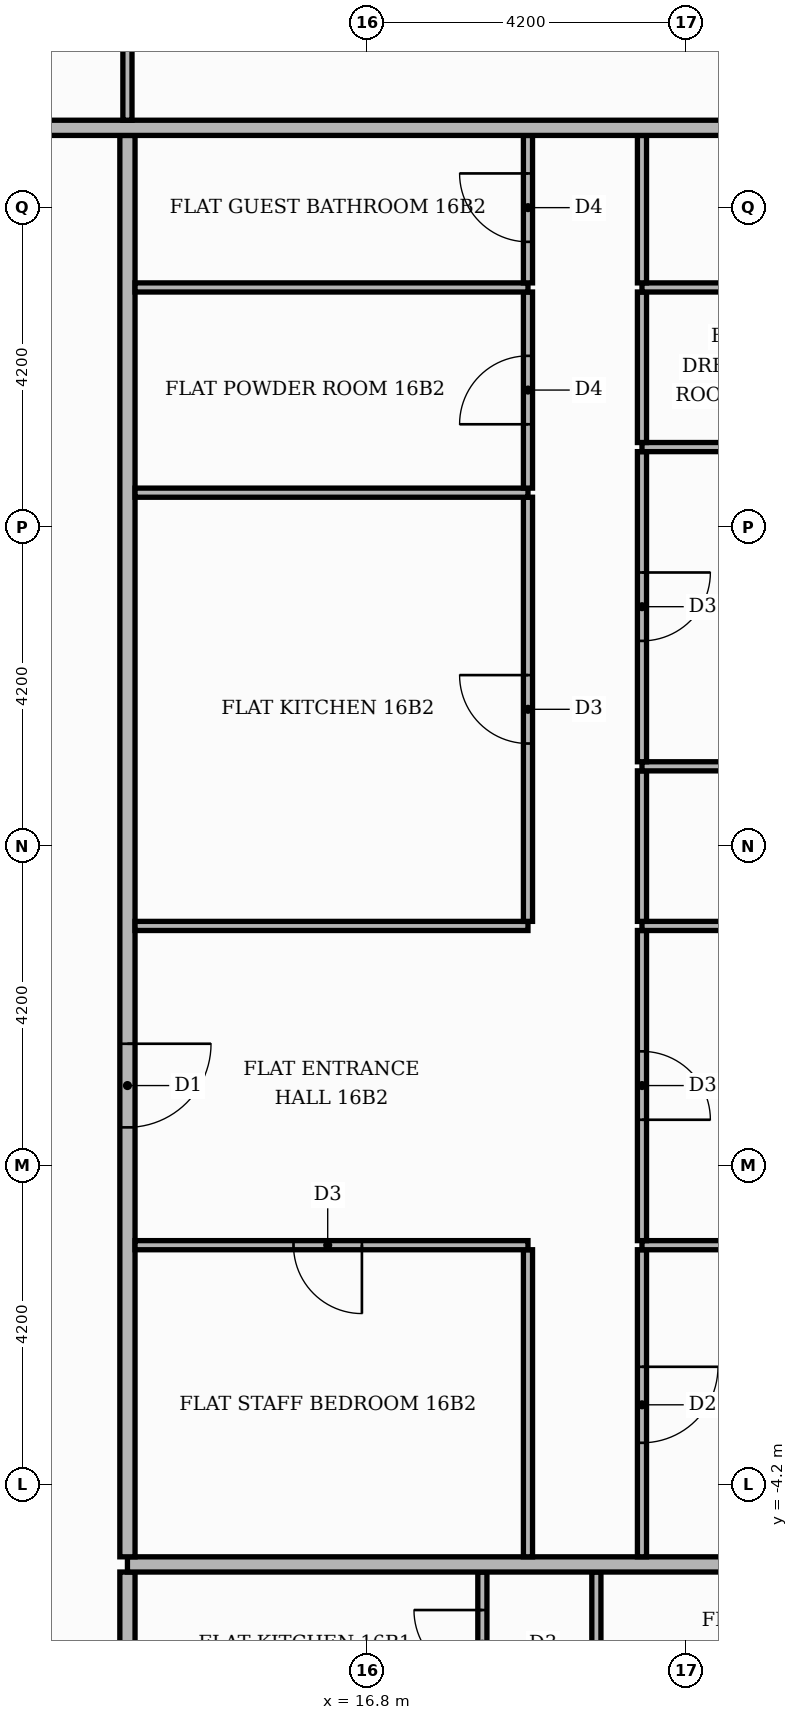
"""IFC4 building model, lengths in metres.
Left out: names, types, materials, properties, quantities, classifications, styles, units other than length and angle.
Written with IfcOpenShell. Run it as: python <this file> out.ifc"""

import sys

from ifc_helpers import new_model, si_unit, direction, frame, frame_2d, origin, place, context, subcontext, project, spatial, rectangle, extrude, element, fill, save


model = new_model("IFC4")
c1 = context("Model", 3, precision=1e-05, world=origin(), true_north=direction((0.0, 1.0)))
c2 = subcontext(c1, "Body", "Model", "MODEL_VIEW")
j1 = project(units=[si_unit("LENGTHUNIT", "METRE"), si_unit("PLANEANGLEUNIT", "RADIAN")], contexts=[c1])
p1 = place(None, origin())
s1 = spatial("IfcSite", under=j1, at=p1, CompositionType="ELEMENT")
p2 = place(p1, origin())
s2 = spatial("IfcBuilding", under=s1, at=p2, CompositionType="ELEMENT")
p3 = place(p2, frame((0.0, 0.0, 69.9)))
s3 = spatial("IfcBuildingStorey", under=s2, at=p3, CompositionType="ELEMENT", Elevation=69.9)
p4 = place(p3, frame((13.65, -13.55, 0.0), z_axis=(0.0, 0.0, 1.0), x_axis=(0.0, 1.0, 0.0)))
e1 = element("IfcWall", 1, at=p4, inside=s3, PredefinedType="PARTITIONING", context=c2, shape_type="SweptSolid", body=[
    extrude(rectangle(XDim=8.2, YDim=0.2, at=frame_2d((4.1, 0.0))), origin(), (0.0, 0.0, 1.0), 3.4),
])
p5 = place(p4, frame((1.45, 0.0, 0.0)))
e2 = element("IfcOpeningElement", 2, at=p5, cuts=e1, PredefinedType="OPENING", context=c2, shape_type="SweptSolid", body=[
    extrude(rectangle(XDim=1.1, YDim=2.4, at=frame_2d((0.55, 1.2))), frame((0.0, 0.11, 0.0), z_axis=(0.0, -1.0, 0.0), x_axis=(1.0, 0.0, 0.0)), (0.0, 0.0, 1.0), 0.22),
])
p6 = place(p3, frame((18.32, -7.29, 0.0), z_axis=(0.0, 0.0, 1.0), x_axis=(0.0, 1.0, 0.0)))
e3 = element("IfcWall", 3, at=p6, inside=s3, PredefinedType="PARTITIONING", context=c2, shape_type="SweptSolid", body=[
    extrude(rectangle(XDim=1.94, YDim=0.12, at=frame_2d((0.97, 0.0))), origin(), (0.0, 0.0, 1.0), 3.4),
])
p7 = place(p6, frame((0.54, 0.0, 0.0)))
e4 = element("IfcOpeningElement", 4, at=p7, cuts=e3, PredefinedType="OPENING", context=c2, shape_type="SweptSolid", body=[
    extrude(rectangle(XDim=0.9, YDim=2.1, at=frame_2d((0.45, 1.05))), frame((0.0, 0.07, 0.0), z_axis=(0.0, -1.0, 0.0), x_axis=(1.0, 0.0, 0.0)), (0.0, 0.0, 1.0), 0.14),
])
p8 = place(p3, frame((19.82, -7.29, 0.0), z_axis=(0.0, 0.0, 1.0), x_axis=(0.0, 1.0, 0.0)))
e5 = element("IfcWall", 5, at=p8, inside=s3, PredefinedType="PARTITIONING", context=c2, shape_type="SweptSolid", body=[
    extrude(rectangle(XDim=1.94, YDim=0.12, at=frame_2d((0.97, 0.0))), origin(), (0.0, 0.0, 1.0), 3.4),
])
p9 = place(p3, frame((13.65, -5.25, 0.0), z_axis=(0.0, 0.0, 1.0), x_axis=(1.0, 0.0, 0.0)))
e6 = element("IfcWall", 6, at=p9, inside=s3, PredefinedType="PARTITIONING", context=c2, shape_type="SweptSolid", body=[
    extrude(rectangle(XDim=11.77, YDim=0.2, at=frame_2d((5.885, 0.0))), origin(), (0.0, 0.0, 1.0), 3.4),
])
p10 = place(p3, frame((13.65, -5.15, 0.0), z_axis=(0.0, 0.0, 1.0), x_axis=(0.0, 1.0, 0.0)))
e7 = element("IfcWall", 7, at=p10, inside=s3, PredefinedType="PARTITIONING", context=c2, shape_type="SweptSolid", body=[
    extrude(rectangle(XDim=18.7, YDim=0.2, at=frame_2d((9.35, 0.0))), origin(), (0.0, 0.0, 1.0), 3.4),
])
p11 = place(p10, frame((5.65, 0.0, 0.0)))
e8 = element("IfcOpeningElement", 8, at=p11, cuts=e7, PredefinedType="OPENING", context=c2, shape_type="SweptSolid", body=[
    extrude(rectangle(XDim=1.1, YDim=2.4, at=frame_2d((0.55, 1.2))), frame((0.0, 0.11, 0.0), z_axis=(0.0, -1.0, 0.0), x_axis=(1.0, 0.0, 0.0)), (0.0, 0.0, 1.0), 0.22),
])
p12 = place(p3, frame((18.92, -5.15, 0.0), z_axis=(0.0, 0.0, 1.0), x_axis=(0.0, 1.0, 0.0)))
e9 = element("IfcWall", 9, at=p12, inside=s3, PredefinedType="PARTITIONING", context=c2, shape_type="SweptSolid", body=[
    extrude(rectangle(XDim=4.04, YDim=0.12, at=frame_2d((2.02, 0.0))), origin(), (0.0, 0.0, 1.0), 3.4),
])
p13 = place(p3, frame((20.42, -5.15, 0.0), z_axis=(0.0, 0.0, 1.0), x_axis=(0.0, 1.0, 0.0)))
e10 = element("IfcWall", 10, at=p13, inside=s3, PredefinedType="PARTITIONING", context=c2, shape_type="SweptSolid", body=[
    extrude(rectangle(XDim=4.04, YDim=0.12, at=frame_2d((2.02, 0.0))), origin(), (0.0, 0.0, 1.0), 3.4),
])
p14 = place(p13, frame((1.5, 0.0, 0.0)))
e11 = element("IfcOpeningElement", 11, at=p14, cuts=e10, PredefinedType="OPENING", context=c2, shape_type="SweptSolid", body=[
    extrude(rectangle(XDim=1.0, YDim=2.1, at=frame_2d((0.5, 1.05))), frame((0.0, 0.07, 0.0), z_axis=(0.0, -1.0, 0.0), x_axis=(1.0, 0.0, 0.0)), (0.0, 0.0, 1.0), 0.14),
])
p15 = place(p3, frame((13.75, -1.05, 0.0), z_axis=(0.0, 0.0, 1.0), x_axis=(1.0, 0.0, 0.0)))
e12 = element("IfcWall", 12, at=p15, inside=s3, PredefinedType="PARTITIONING", context=c2, shape_type="SweptSolid", body=[
    extrude(rectangle(XDim=5.17, YDim=0.12, at=frame_2d((2.585, 0.0))), origin(), (0.0, 0.0, 1.0), 3.4),
])
p16 = place(p15, frame((2.085, 0.0, 0.0)))
e13 = element("IfcOpeningElement", 13, at=p16, cuts=e12, PredefinedType="OPENING", context=c2, shape_type="SweptSolid", body=[
    extrude(rectangle(XDim=0.9, YDim=2.1, at=frame_2d((0.45, 1.05))), frame((0.0, 0.07, 0.0), z_axis=(0.0, -1.0, 0.0), x_axis=(1.0, 0.0, 0.0)), (0.0, 0.0, 1.0), 0.14),
])
p17 = place(p3, frame((20.42, -1.05, 0.0), z_axis=(0.0, 0.0, 1.0), x_axis=(1.0, 0.0, 0.0)))
e14 = element("IfcWall", 14, at=p17, inside=s3, PredefinedType="PARTITIONING", context=c2, shape_type="SweptSolid", body=[
    extrude(rectangle(XDim=5.0, YDim=0.12, at=frame_2d((2.5, 0.0))), origin(), (0.0, 0.0, 1.0), 3.4),
])
p18 = place(p3, frame((20.42, -0.99, 0.0), z_axis=(0.0, 0.0, 1.0), x_axis=(0.0, 1.0, 0.0)))
e15 = element("IfcWall", 15, at=p18, inside=s3, PredefinedType="PARTITIONING", context=c2, shape_type="SweptSolid", body=[
    extrude(rectangle(XDim=4.08, YDim=0.12, at=frame_2d((2.04, 0.0))), origin(), (0.0, 0.0, 1.0), 3.4),
])
p19 = place(p18, frame((1.59, 0.0, 0.0)))
e16 = element("IfcOpeningElement", 16, at=p19, cuts=e15, PredefinedType="OPENING", context=c2, shape_type="SweptSolid", body=[
    extrude(rectangle(XDim=0.9, YDim=2.1, at=frame_2d((0.45, 1.05))), frame((0.0, 0.07, 0.0), z_axis=(0.0, -1.0, 0.0), x_axis=(1.0, 0.0, 0.0)), (0.0, 0.0, 1.0), 0.14),
])
p20 = place(p3, frame((13.75, 3.15, 0.0), z_axis=(0.0, 0.0, 1.0), x_axis=(1.0, 0.0, 0.0)))
e17 = element("IfcWall", 17, at=p20, inside=s3, PredefinedType="PARTITIONING", context=c2, shape_type="SweptSolid", body=[
    extrude(rectangle(XDim=5.17, YDim=0.12, at=frame_2d((2.585, 0.0))), origin(), (0.0, 0.0, 1.0), 3.4),
])
p21 = place(p3, frame((20.42, 3.15, 0.0), z_axis=(0.0, 0.0, 1.0), x_axis=(1.0, 0.0, 0.0)))
e18 = element("IfcWall", 18, at=p21, inside=s3, PredefinedType="PARTITIONING", context=c2, shape_type="SweptSolid", body=[
    extrude(rectangle(XDim=5.0, YDim=0.12, at=frame_2d((2.5, 0.0))), origin(), (0.0, 0.0, 1.0), 3.4),
])
p22 = place(p21, frame((2.2, 0.0, 0.0)))
e19 = element("IfcOpeningElement", 19, at=p22, cuts=e18, PredefinedType="OPENING", context=c2, shape_type="SweptSolid", body=[
    extrude(rectangle(XDim=0.9, YDim=2.1, at=frame_2d((0.45, 1.05))), frame((0.0, 0.07, 0.0), z_axis=(0.0, -1.0, 0.0), x_axis=(1.0, 0.0, 0.0)), (0.0, 0.0, 1.0), 0.14),
])
p23 = place(p3, frame((18.92, 3.21, 0.0), z_axis=(0.0, 0.0, 1.0), x_axis=(0.0, 1.0, 0.0)))
e20 = element("IfcWall", 20, at=p23, inside=s3, PredefinedType="PARTITIONING", context=c2, shape_type="SweptSolid", body=[
    extrude(rectangle(XDim=5.58, YDim=0.12, at=frame_2d((2.79, 0.0))), origin(), (0.0, 0.0, 1.0), 3.4),
])
p24 = place(p23, frame((2.34, 0.0, 0.0)))
e21 = element("IfcOpeningElement", 21, at=p24, cuts=e20, PredefinedType="OPENING", context=c2, shape_type="SweptSolid", body=[
    extrude(rectangle(XDim=0.9, YDim=2.1, at=frame_2d((0.45, 1.05))), frame((0.0, 0.07, 0.0), z_axis=(0.0, -1.0, 0.0), x_axis=(1.0, 0.0, 0.0)), (0.0, 0.0, 1.0), 0.14),
])
p25 = place(p3, frame((20.42, 3.21, 0.0), z_axis=(0.0, 0.0, 1.0), x_axis=(0.0, 1.0, 0.0)))
e22 = element("IfcWall", 22, at=p25, inside=s3, PredefinedType="PARTITIONING", context=c2, shape_type="SweptSolid", body=[
    extrude(rectangle(XDim=1.98, YDim=0.12, at=frame_2d((0.99, 0.0))), origin(), (0.0, 0.0, 1.0), 3.4),
])
p26 = place(p3, frame((20.42, 5.25, 0.0), z_axis=(0.0, 0.0, 1.0), x_axis=(1.0, 0.0, 0.0)))
e23 = element("IfcWall", 23, at=p26, inside=s3, PredefinedType="PARTITIONING", context=c2, shape_type="SweptSolid", body=[
    extrude(rectangle(XDim=5.0, YDim=0.12, at=frame_2d((2.5, 0.0))), origin(), (0.0, 0.0, 1.0), 3.4),
])
p27 = place(p3, frame((20.42, 5.31, 0.0), z_axis=(0.0, 0.0, 1.0), x_axis=(0.0, 1.0, 0.0)))
e24 = element("IfcWall", 24, at=p27, inside=s3, PredefinedType="PARTITIONING", context=c2, shape_type="SweptSolid", body=[
    extrude(rectangle(XDim=4.08, YDim=0.12, at=frame_2d((2.04, 0.0))), origin(), (0.0, 0.0, 1.0), 3.4),
])
p28 = place(p27, frame((1.59, 0.0, 0.0)))
e25 = element("IfcOpeningElement", 25, at=p28, cuts=e24, PredefinedType="OPENING", context=c2, shape_type="SweptSolid", body=[
    extrude(rectangle(XDim=0.9, YDim=2.1, at=frame_2d((0.45, 1.05))), frame((0.0, 0.07, 0.0), z_axis=(0.0, -1.0, 0.0), x_axis=(1.0, 0.0, 0.0)), (0.0, 0.0, 1.0), 0.14),
])
p29 = place(p3, frame((13.75, 8.85, 0.0), z_axis=(0.0, 0.0, 1.0), x_axis=(1.0, 0.0, 0.0)))
e26 = element("IfcWall", 26, at=p29, inside=s3, PredefinedType="PARTITIONING", context=c2, shape_type="SweptSolid", body=[
    extrude(rectangle(XDim=5.17, YDim=0.12, at=frame_2d((2.585, 0.0))), origin(), (0.0, 0.0, 1.0), 3.4),
])
p30 = place(p3, frame((18.92, 8.91, 0.0), z_axis=(0.0, 0.0, 1.0), x_axis=(0.0, 1.0, 0.0)))
e27 = element("IfcWall", 27, at=p30, inside=s3, PredefinedType="PARTITIONING", context=c2, shape_type="SweptSolid", body=[
    extrude(rectangle(XDim=2.58, YDim=0.12, at=frame_2d((1.29, 0.0))), origin(), (0.0, 0.0, 1.0), 3.4),
])
p31 = place(p30, frame((0.84, 0.0, 0.0)))
e28 = element("IfcOpeningElement", 28, at=p31, cuts=e27, PredefinedType="OPENING", context=c2, shape_type="SweptSolid", body=[
    extrude(rectangle(XDim=0.9, YDim=2.1, at=frame_2d((0.45, 1.05))), frame((0.0, 0.07, 0.0), z_axis=(0.0, -1.0, 0.0), x_axis=(1.0, 0.0, 0.0)), (0.0, 0.0, 1.0), 0.14),
])
p32 = place(p3, frame((20.42, 9.45, 0.0), z_axis=(0.0, 0.0, 1.0), x_axis=(1.0, 0.0, 0.0)))
e29 = element("IfcWall", 29, at=p32, inside=s3, PredefinedType="PARTITIONING", context=c2, shape_type="SweptSolid", body=[
    extrude(rectangle(XDim=5.0, YDim=0.12, at=frame_2d((2.5, 0.0))), origin(), (0.0, 0.0, 1.0), 3.4),
])
p33 = place(p32, frame((2.2, 0.0, 0.0)))
e30 = element("IfcOpeningElement", 30, at=p33, cuts=e29, PredefinedType="OPENING", context=c2, shape_type="SweptSolid", body=[
    extrude(rectangle(XDim=0.9, YDim=2.1, at=frame_2d((0.45, 1.05))), frame((0.0, 0.07, 0.0), z_axis=(0.0, -1.0, 0.0), x_axis=(1.0, 0.0, 0.0)), (0.0, 0.0, 1.0), 0.14),
])
p34 = place(p3, frame((20.42, 9.51, 0.0), z_axis=(0.0, 0.0, 1.0), x_axis=(0.0, 1.0, 0.0)))
e31 = element("IfcWall", 31, at=p34, inside=s3, PredefinedType="PARTITIONING", context=c2, shape_type="SweptSolid", body=[
    extrude(rectangle(XDim=1.98, YDim=0.12, at=frame_2d((0.99, 0.0))), origin(), (0.0, 0.0, 1.0), 3.4),
])
p35 = place(p3, frame((13.75, 11.55, 0.0), z_axis=(0.0, 0.0, 1.0), x_axis=(1.0, 0.0, 0.0)))
e32 = element("IfcWall", 32, at=p35, inside=s3, PredefinedType="PARTITIONING", context=c2, shape_type="SweptSolid", body=[
    extrude(rectangle(XDim=5.17, YDim=0.12, at=frame_2d((2.585, 0.0))), origin(), (0.0, 0.0, 1.0), 3.4),
])
p36 = place(p3, frame((20.42, 11.55, 0.0), z_axis=(0.0, 0.0, 1.0), x_axis=(1.0, 0.0, 0.0)))
e33 = element("IfcWall", 33, at=p36, inside=s3, PredefinedType="PARTITIONING", context=c2, shape_type="SweptSolid", body=[
    extrude(rectangle(XDim=5.0, YDim=0.12, at=frame_2d((2.5, 0.0))), origin(), (0.0, 0.0, 1.0), 3.4),
])
p37 = place(p36, frame((2.2, 0.0, 0.0)))
e34 = element("IfcOpeningElement", 34, at=p37, cuts=e33, PredefinedType="OPENING", context=c2, shape_type="SweptSolid", body=[
    extrude(rectangle(XDim=0.9, YDim=2.1, at=frame_2d((0.45, 1.05))), frame((0.0, 0.07, 0.0), z_axis=(0.0, -1.0, 0.0), x_axis=(1.0, 0.0, 0.0)), (0.0, 0.0, 1.0), 0.14),
])
p38 = place(p3, frame((18.92, 11.61, 0.0), z_axis=(0.0, 0.0, 1.0), x_axis=(0.0, 1.0, 0.0)))
e35 = element("IfcWall", 35, at=p38, inside=s3, PredefinedType="PARTITIONING", context=c2, shape_type="SweptSolid", body=[
    extrude(rectangle(XDim=1.94, YDim=0.12, at=frame_2d((0.97, 0.0))), origin(), (0.0, 0.0, 1.0), 3.4),
])
p39 = place(p38, frame((0.54, 0.0, 0.0)))
e36 = element("IfcOpeningElement", 36, at=p39, cuts=e35, PredefinedType="OPENING", context=c2, shape_type="SweptSolid", body=[
    extrude(rectangle(XDim=0.9, YDim=2.1, at=frame_2d((0.45, 1.05))), frame((0.0, 0.07, 0.0), z_axis=(0.0, -1.0, 0.0), x_axis=(1.0, 0.0, 0.0)), (0.0, 0.0, 1.0), 0.14),
])
p40 = place(p3, frame((20.42, 11.61, 0.0), z_axis=(0.0, 0.0, 1.0), x_axis=(0.0, 1.0, 0.0)))
e37 = element("IfcWall", 37, at=p40, inside=s3, PredefinedType="PARTITIONING", context=c2, shape_type="SweptSolid", body=[
    extrude(rectangle(XDim=1.94, YDim=0.12, at=frame_2d((0.97, 0.0))), origin(), (0.0, 0.0, 1.0), 3.4),
])
p41 = place(p3, frame((-13.65, 13.65, 0.0), z_axis=(0.0, 0.0, 1.0), x_axis=(1.0, 0.0, 0.0)))
e38 = element("IfcWall", 38, at=p41, inside=s3, PredefinedType="PARTITIONING", context=c2, shape_type="SweptSolid", body=[
    extrude(rectangle(XDim=39.07, YDim=0.2, at=frame_2d((19.535, 0.0))), origin(), (0.0, 0.0, 1.0), 3.4),
])
p42 = place(p41, frame((23.6, 0.0, 0.0)))
e39 = element("IfcOpeningElement", 39, at=p42, cuts=e38, PredefinedType="OPENING", context=c2, shape_type="SweptSolid", body=[
    extrude(rectangle(XDim=1.1, YDim=2.4, at=frame_2d((0.55, 1.2))), frame((0.0, 0.11, 0.0), z_axis=(0.0, -1.0, 0.0), x_axis=(1.0, 0.0, 0.0)), (0.0, 0.0, 1.0), 0.22),
])
p43 = place(p3, frame((13.65, 13.75, 0.0), z_axis=(0.0, 0.0, 1.0), x_axis=(0.0, 1.0, 0.0)))
e40 = element("IfcWall", 40, at=p43, inside=s3, PredefinedType="PARTITIONING", context=c2, shape_type="SweptSolid", body=[
    extrude(rectangle(XDim=6.91, YDim=0.12, at=frame_2d((3.455, 0.0))), origin(), (0.0, 0.0, 1.0), 3.4),
])
p44 = place(p43, frame((2.935, 0.0, 0.0)))
e41 = element("IfcOpeningElement", 41, at=p44, cuts=e40, PredefinedType="OPENING", context=c2, shape_type="SweptSolid", body=[
    extrude(rectangle(XDim=1.0, YDim=2.1, at=frame_2d((0.5, 1.05))), frame((0.0, 0.07, 0.0), z_axis=(0.0, -1.0, 0.0), x_axis=(1.0, 0.0, 0.0)), (0.0, 0.0, 1.0), 0.14),
])
p45 = place(p7, origin())
e42 = element("IfcDoor", 42, at=p45, inside=s3, OperationType="SINGLE_SWING_RIGHT", PredefinedType="DOOR", context=c2, shape_type="SweptSolid", body=[
    extrude(rectangle(XDim=0.9, YDim=2.1, at=frame_2d((0.45, 1.05))), frame((0.0, 0.025, 0.0), z_axis=(0.0, -1.0, 0.0), x_axis=(1.0, 0.0, 0.0)), (0.0, 0.0, 1.0), 0.05),
])
fill(e4, e42)
p46 = place(p11, frame((1.1, 0.0, 0.0), z_axis=(0.0, 0.0, 1.0), x_axis=(-1.0, 0.0, 0.0)))
e43 = element("IfcDoor", 43, at=p46, inside=s3, OperationType="SINGLE_SWING_RIGHT", PredefinedType="DOOR", context=c2, shape_type="SweptSolid", body=[
    extrude(rectangle(XDim=1.1, YDim=2.4, at=frame_2d((0.55, 1.2))), frame((0.0, 0.025, 0.0), z_axis=(0.0, -1.0, 0.0), x_axis=(1.0, 0.0, 0.0)), (0.0, 0.0, 1.0), 0.05),
])
fill(e8, e43)
p47 = place(p16, frame((0.9, 0.0, 0.0), z_axis=(0.0, 0.0, 1.0), x_axis=(-1.0, 0.0, 0.0)))
e44 = element("IfcDoor", 44, at=p47, inside=s3, OperationType="SINGLE_SWING_RIGHT", PredefinedType="DOOR", context=c2, shape_type="SweptSolid", body=[
    extrude(rectangle(XDim=0.9, YDim=2.1, at=frame_2d((0.45, 1.05))), frame((0.0, 0.025, 0.0), z_axis=(0.0, -1.0, 0.0), x_axis=(1.0, 0.0, 0.0)), (0.0, 0.0, 1.0), 0.05),
])
fill(e13, e44)
p48 = place(p24, origin())
e45 = element("IfcDoor", 45, at=p48, inside=s3, OperationType="SINGLE_SWING_RIGHT", PredefinedType="DOOR", context=c2, shape_type="SweptSolid", body=[
    extrude(rectangle(XDim=0.9, YDim=2.1, at=frame_2d((0.45, 1.05))), frame((0.0, 0.025, 0.0), z_axis=(0.0, -1.0, 0.0), x_axis=(1.0, 0.0, 0.0)), (0.0, 0.0, 1.0), 0.05),
])
fill(e21, e45)
p49 = place(p31, origin())
e46 = element("IfcDoor", 46, at=p49, inside=s3, OperationType="SINGLE_SWING_LEFT", PredefinedType="DOOR", context=c2, shape_type="SweptSolid", body=[
    extrude(rectangle(XDim=0.9, YDim=2.1, at=frame_2d((0.45, 1.05))), frame((0.0, 0.025, 0.0), z_axis=(0.0, -1.0, 0.0), x_axis=(1.0, 0.0, 0.0)), (0.0, 0.0, 1.0), 0.05),
])
fill(e28, e46)
p50 = place(p39, origin())
e47 = element("IfcDoor", 47, at=p50, inside=s3, OperationType="SINGLE_SWING_RIGHT", PredefinedType="DOOR", context=c2, shape_type="SweptSolid", body=[
    extrude(rectangle(XDim=0.9, YDim=2.1, at=frame_2d((0.45, 1.05))), frame((0.0, 0.025, 0.0), z_axis=(0.0, -1.0, 0.0), x_axis=(1.0, 0.0, 0.0)), (0.0, 0.0, 1.0), 0.05),
])
fill(e36, e47)
p51 = place(p14, frame((1.0, 0.0, 0.0), z_axis=(0.0, 0.0, 1.0), x_axis=(-1.0, 0.0, 0.0)))
e48 = element("IfcDoor", 48, at=p51, inside=s3, OperationType="SINGLE_SWING_RIGHT", PredefinedType="DOOR", context=c2, shape_type="SweptSolid", body=[
    extrude(rectangle(XDim=1.0, YDim=2.1, at=frame_2d((0.5, 1.05))), frame((0.0, 0.025, 0.0), z_axis=(0.0, -1.0, 0.0), x_axis=(1.0, 0.0, 0.0)), (0.0, 0.0, 1.0), 0.05),
])
fill(e11, e48)
p52 = place(p19, frame((0.9, 0.0, 0.0), z_axis=(0.0, 0.0, 1.0), x_axis=(-1.0, 0.0, 0.0)))
e49 = element("IfcDoor", 49, at=p52, inside=s3, OperationType="SINGLE_SWING_LEFT", PredefinedType="DOOR", context=c2, shape_type="SweptSolid", body=[
    extrude(rectangle(XDim=0.9, YDim=2.1, at=frame_2d((0.45, 1.05))), frame((0.0, 0.025, 0.0), z_axis=(0.0, -1.0, 0.0), x_axis=(1.0, 0.0, 0.0)), (0.0, 0.0, 1.0), 0.05),
])
fill(e16, e49)
p53 = place(p28, frame((0.9, 0.0, 0.0), z_axis=(0.0, 0.0, 1.0), x_axis=(-1.0, 0.0, 0.0)))
e50 = element("IfcDoor", 50, at=p53, inside=s3, OperationType="SINGLE_SWING_RIGHT", PredefinedType="DOOR", context=c2, shape_type="SweptSolid", body=[
    extrude(rectangle(XDim=0.9, YDim=2.1, at=frame_2d((0.45, 1.05))), frame((0.0, 0.025, 0.0), z_axis=(0.0, -1.0, 0.0), x_axis=(1.0, 0.0, 0.0)), (0.0, 0.0, 1.0), 0.05),
])
fill(e25, e50)
save(model, sys.argv[1])
